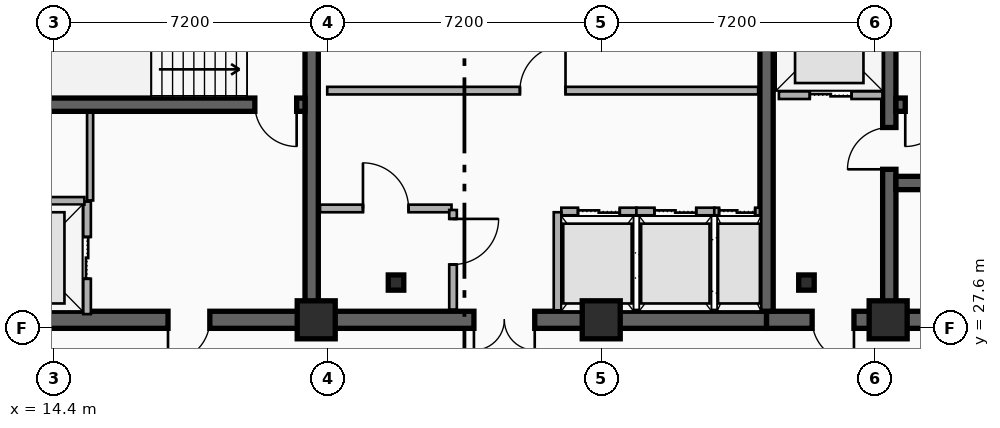
"""IFC4 building model, lengths in metres.
Left out: names, types, materials, properties, quantities, classifications, styles, units other than length and angle.
Written with IfcOpenShell. Run it as: python <this file> out.ifc"""

import sys

from ifc_helpers import new_model, si_unit, direction, frame, frame_2d, origin, origin_2d, place, context, subcontext, project, spatial, rectangle, i_section, extrude, element, fill, save


model = new_model("IFC4")
c1 = context("Model", 3, precision=1e-05, world=origin(), true_north=direction((0.0, 1.0)))
c2 = subcontext(c1, "Body", "Model", "MODEL_VIEW")
j1 = project(units=[si_unit("LENGTHUNIT", "METRE"), si_unit("PLANEANGLEUNIT", "RADIAN")], contexts=[c1])
p1 = place(None, origin())
s1 = spatial("IfcSite", under=j1, at=p1, CompositionType="ELEMENT")
p2 = place(p1, origin())
s2 = spatial("IfcBuilding", under=s1, at=p2, CompositionType="ELEMENT")
p3 = place(p2, frame((0.0, 0.0, 204.0)))
s3 = spatial("IfcBuildingStorey", under=s2, at=p3, CompositionType="ELEMENT", Elevation=204.0)
p4 = place(p3, frame((21.18, 27.82, 0.0), z_axis=(0.0, 0.0, 1.0), x_axis=(-1.0, 0.0, 0.0)))
e1 = element("IfcWall", 1, at=p4, inside=s3, PredefinedType="SHEAR", context=c2, shape_type="SweptSolid", body=[
    extrude(rectangle(XDim=9.03, YDim=0.45, at=frame_2d((4.515, 0.0))), origin(), (0.0, 0.0, 1.0), 3.6),
])
p5 = place(p4, frame((2.68, 0.0, 0.0)))
e2 = element("IfcOpeningElement", 2, at=p5, cuts=e1, PredefinedType="OPENING", context=c2, shape_type="SweptSolid", body=[
    extrude(rectangle(XDim=1.1, YDim=2.15, at=frame_2d((0.55, 1.075))), frame((0.0, 0.235, 0.0), z_axis=(0.0, -1.0, 0.0), x_axis=(1.0, 0.0, 0.0)), (0.0, 0.0, 1.0), 0.47),
])
p6 = place(p3, frame((33.15, 27.82, 0.0), z_axis=(0.0, 0.0, 1.0), x_axis=(-1.0, 0.0, 0.0)))
e3 = element("IfcWall", 3, at=p6, inside=s3, PredefinedType="SHEAR", context=c2, shape_type="SweptSolid", body=[
    extrude(rectangle(XDim=11.97, YDim=0.45, at=frame_2d((5.985, 0.0))), origin(), (0.0, 0.0, 1.0), 3.6),
])
p7 = place(p6, frame((6.1, 0.0, 0.0)))
e4 = element("IfcOpeningElement", 4, at=p7, cuts=e3, PredefinedType="OPENING", context=c2, shape_type="SweptSolid", body=[
    extrude(rectangle(XDim=1.6, YDim=2.2, at=frame_2d((0.8, 1.1))), frame((0.0, 0.235, 0.0), z_axis=(0.0, -1.0, 0.0), x_axis=(1.0, 0.0, 0.0)), (0.0, 0.0, 1.0), 0.47),
])
p8 = place(p3, frame((45.38, 27.82, 0.0), z_axis=(0.0, 0.0, 1.0), x_axis=(-1.0, 0.0, 0.0)))
e5 = element("IfcWall", 5, at=p8, inside=s3, PredefinedType="SHEAR", context=c2, shape_type="SweptSolid", body=[
    extrude(rectangle(XDim=12.23, YDim=0.45, at=frame_2d((6.115, 0.0))), origin(), (0.0, 0.0, 1.0), 3.6),
])
p9 = place(p8, frame((9.93, 0.0, 0.0)))
e6 = element("IfcOpeningElement", 6, at=p9, cuts=e5, PredefinedType="OPENING", context=c2, shape_type="SweptSolid", body=[
    extrude(rectangle(XDim=1.1, YDim=2.15, at=frame_2d((0.55, 1.075))), frame((0.0, 0.235, 0.0), z_axis=(0.0, -1.0, 0.0), x_axis=(1.0, 0.0, 0.0)), (0.0, 0.0, 1.0), 0.47),
])
p10 = place(p8, frame((6.23, 0.0, 0.0)))
e7 = element("IfcOpeningElement", 7, at=p10, cuts=e5, PredefinedType="OPENING", context=c2, shape_type="SweptSolid", body=[
    extrude(rectangle(XDim=1.1, YDim=2.15, at=frame_2d((0.55, 1.075))), frame((0.0, 0.235, 0.0), z_axis=(0.0, -1.0, 0.0), x_axis=(1.0, 0.0, 0.0)), (0.0, 0.0, 1.0), 0.47),
])
for number, where, z_axis, x_axis in (
    (8, (21.18, 28.045, 0.0), (0.0, 0.0, 1.0), (0.0, 1.0, 0.0)),
    (9, (33.15, 28.045, 0.0), (0.0, 0.0, 1.0), (0.0, 1.0, 0.0)),
):
    element("IfcWall", number, at=place(p3, frame(where, z_axis=z_axis, x_axis=x_axis)), inside=s3, PredefinedType="SHEAR", context=c2, shape_type="SweptSolid", body=[
        extrude(rectangle(XDim=8.78, YDim=0.35, at=frame_2d((4.39, 0.0))), origin(), (0.0, 0.0, 1.0), 3.6),
    ])
p11 = place(p3, frame((36.38, 28.045, 0.0), z_axis=(0.0, 0.0, 1.0), x_axis=(0.0, 1.0, 0.0)))
e10 = element("IfcWall", 10, at=p11, inside=s3, PredefinedType="SHEAR", context=c2, shape_type="SweptSolid", body=[
    extrude(rectangle(XDim=8.78, YDim=0.35, at=frame_2d((4.39, 0.0))), origin(), (0.0, 0.0, 1.0), 3.6),
])
p12 = place(p11, frame((3.735, 0.0, 0.0)))
e11 = element("IfcOpeningElement", 11, at=p12, cuts=e10, PredefinedType="OPENING", context=c2, shape_type="SweptSolid", body=[
    extrude(rectangle(XDim=1.1, YDim=2.15, at=frame_2d((0.55, 1.075))), frame((0.0, 0.185, 0.0), z_axis=(0.0, -1.0, 0.0), x_axis=(1.0, 0.0, 0.0)), (0.0, 0.0, 1.0), 0.37),
])
p13 = place(p3, frame((21.005, 33.48, 0.0), z_axis=(0.0, 0.0, 1.0), x_axis=(-1.0, 0.0, 0.0)))
e12 = element("IfcWall", 12, at=p13, inside=s3, PredefinedType="SHEAR", context=c2, shape_type="SweptSolid", body=[
    extrude(rectangle(XDim=8.63, YDim=0.35, at=frame_2d((4.315, 0.0))), origin(), (0.0, 0.0, 1.0), 3.6),
])
p14 = place(p13, frame((0.22, 0.0, 0.0)))
e13 = element("IfcOpeningElement", 13, at=p14, cuts=e12, PredefinedType="OPENING", context=c2, shape_type="SweptSolid", body=[
    extrude(rectangle(XDim=1.1, YDim=2.15, at=frame_2d((0.55, 1.075))), frame((0.0, 0.185, 0.0), z_axis=(0.0, -1.0, 0.0), x_axis=(1.0, 0.0, 0.0)), (0.0, 0.0, 1.0), 0.37),
])
p15 = place(p3, frame((45.155, 33.48, 0.0), z_axis=(0.0, 0.0, 1.0), x_axis=(-1.0, 0.0, 0.0)))
e14 = element("IfcWall", 14, at=p15, inside=s3, PredefinedType="SHEAR", context=c2, shape_type="SweptSolid", body=[
    extrude(rectangle(XDim=8.6, YDim=0.35, at=frame_2d((4.3, 0.0))), origin(), (0.0, 0.0, 1.0), 3.6),
])
p16 = place(p15, frame((7.255, 0.0, 0.0)))
e15 = element("IfcOpeningElement", 15, at=p16, cuts=e14, PredefinedType="OPENING", context=c2, shape_type="SweptSolid", body=[
    extrude(rectangle(XDim=1.1, YDim=2.15, at=frame_2d((0.55, 1.075))), frame((0.0, 0.185, 0.0), z_axis=(0.0, -1.0, 0.0), x_axis=(1.0, 0.0, 0.0)), (0.0, 0.0, 1.0), 0.37),
])
p17 = place(p3, frame((36.555, 31.42, 0.0), z_axis=(0.0, 0.0, 1.0), x_axis=(1.0, 0.0, 0.0)))
e16 = element("IfcWall", 16, at=p17, inside=s3, PredefinedType="SHEAR", context=c2, shape_type="SweptSolid", body=[
    extrude(rectangle(XDim=8.6, YDim=0.35, at=frame_2d((4.3, 0.0))), origin(), (0.0, 0.0, 1.0), 3.6),
])
for number, where, z_axis, x_axis in (
    (17, (23.4, 28.8, 0.0), (0.0, 0.0, 1.0), (1.0, 0.0, 0.0)),
    (18, (34.2, 28.8, 0.0), (0.0, 0.0, 1.0), (1.0, 0.0, 0.0)),
):
    element("IfcColumn", number, at=place(p3, frame(where, z_axis=z_axis, x_axis=x_axis)), inside=s3, PredefinedType="COLUMN", context=c2, shape_type="SweptSolid", body=[
        extrude(i_section(OverallWidth=0.408, OverallDepth=0.4, WebThickness=0.025, FlangeThickness=0.039, FilletRadius=0.015, at=origin_2d()), origin(), (0.0, 0.0, 1.0), 3.6),
    ])
for number, where, z_axis, x_axis in (
    (19, (21.3, 27.82, 0.0), (0.0, 0.0, 1.0), (1.0, 0.0, 0.0)),
    (20, (28.8, 27.82, 0.0), (0.0, 0.0, 1.0), (1.0, 0.0, 0.0)),
    (21, (36.35, 27.82, 0.0), (0.0, 0.0, 1.0), (1.0, 0.0, 0.0)),
):
    element("IfcColumn", number, at=place(p3, frame(where, z_axis=z_axis, x_axis=x_axis)), inside=s3, PredefinedType="COLUMN", context=c2, shape_type="SweptSolid", body=[
        extrude(rectangle(XDim=1.0, YDim=1.0, at=origin_2d()), origin(), (0.0, 0.0, 1.0), 3.6),
    ])
p18 = place(p3, frame((15.27, 27.97, 0.0), z_axis=(0.0, 0.0, 1.0), x_axis=(0.0, 1.0, 0.0)))
e22 = element("IfcWall", 22, at=p18, inside=s3, PredefinedType="PARTITIONING", context=c2, shape_type="SweptSolid", body=[
    extrude(rectangle(XDim=2.96, YDim=0.2, at=frame_2d((1.48, 0.0))), origin(), (0.0, 0.0, 1.0), 2.41),
])
p19 = place(p18, frame((0.93, 0.0, 0.0)))
e23 = element("IfcOpeningElement", 23, at=p19, cuts=e22, PredefinedType="OPENING", context=c2, shape_type="SweptSolid", body=[
    extrude(rectangle(XDim=1.1, YDim=2.15, at=frame_2d((0.55, 1.075))), frame((0.0, 0.11, 0.0), z_axis=(0.0, -1.0, 0.0), x_axis=(1.0, 0.0, 0.0)), (0.0, 0.0, 1.0), 0.22),
])
p20 = place(p3, frame((12.45, 30.95, 0.0), z_axis=(0.0, 0.0, 1.0), x_axis=(1.0, 0.0, 0.0)))
e24 = element("IfcWall", 24, at=p20, inside=s3, PredefinedType="PARTITIONING", context=c2, shape_type="SweptSolid", body=[
    extrude(rectangle(XDim=2.75, YDim=0.2, at=frame_2d((1.375, 0.0))), origin(), (0.0, 0.0, 1.0), 2.41),
])
p21 = place(p3, frame((33.475, 33.73, 0.0), z_axis=(0.0, 0.0, 1.0), x_axis=(1.0, 0.0, 0.0)))
e25 = element("IfcWall", 25, at=p21, inside=s3, PredefinedType="PARTITIONING", context=c2, shape_type="SweptSolid", body=[
    extrude(rectangle(XDim=2.725, YDim=0.2, at=frame_2d((1.362, 0.0))), origin(), (0.0, 0.0, 1.0), 2.41),
])
p22 = place(p21, frame((0.812, 0.0, 0.0)))
e26 = element("IfcOpeningElement", 26, at=p22, cuts=e25, PredefinedType="OPENING", context=c2, shape_type="SweptSolid", body=[
    extrude(rectangle(XDim=1.1, YDim=2.15, at=frame_2d((0.55, 1.075))), frame((0.0, 0.11, 0.0), z_axis=(0.0, -1.0, 0.0), x_axis=(1.0, 0.0, 0.0)), (0.0, 0.0, 1.0), 0.22),
])
p23 = place(p3, frame((27.75, 30.67, 0.0), z_axis=(0.0, 0.0, 1.0), x_axis=(1.0, 0.0, 0.0)))
e27 = element("IfcWall", 27, at=p23, inside=s3, PredefinedType="PARTITIONING", context=c2, shape_type="SweptSolid", body=[
    extrude(rectangle(XDim=1.975, YDim=0.2, at=frame_2d((0.988, 0.0))), origin(), (0.0, 0.0, 1.0), 2.41),
])
p24 = place(p23, frame((0.438, 0.0, 0.0)))
e28 = element("IfcOpeningElement", 28, at=p24, cuts=e27, PredefinedType="OPENING", context=c2, shape_type="SweptSolid", body=[
    extrude(rectangle(XDim=1.1, YDim=2.15, at=frame_2d((0.55, 1.075))), frame((0.0, 0.11, 0.0), z_axis=(0.0, -1.0, 0.0), x_axis=(1.0, 0.0, 0.0)), (0.0, 0.0, 1.0), 0.22),
])
p25 = place(p3, frame((27.65, 28.07, 0.0), z_axis=(0.0, 0.0, 1.0), x_axis=(0.0, 1.0, 0.0)))
e29 = element("IfcWall", 29, at=p25, inside=s3, PredefinedType="PARTITIONING", context=c2, shape_type="SweptSolid", body=[
    extrude(rectangle(XDim=2.58, YDim=0.2, at=frame_2d((1.29, 0.0))), origin(), (0.0, 0.0, 1.0), 2.41),
])
p26 = place(p3, frame((29.725, 30.67, 0.0), z_axis=(0.0, 0.0, 1.0), x_axis=(1.0, 0.0, 0.0)))
e30 = element("IfcWall", 30, at=p26, inside=s3, PredefinedType="PARTITIONING", context=c2, shape_type="SweptSolid", body=[
    extrude(rectangle(XDim=2.05, YDim=0.2, at=frame_2d((1.025, 0.0))), origin(), (0.0, 0.0, 1.0), 2.72),
])
p27 = place(p26, frame((0.475, 0.0, 0.0)))
e31 = element("IfcOpeningElement", 31, at=p27, cuts=e30, PredefinedType="OPENING", context=c2, shape_type="SweptSolid", body=[
    extrude(rectangle(XDim=1.1, YDim=2.15, at=frame_2d((0.55, 1.075))), frame((0.0, 0.11, 0.0), z_axis=(0.0, -1.0, 0.0), x_axis=(1.0, 0.0, 0.0)), (0.0, 0.0, 1.0), 0.22),
])
p28 = place(p3, frame((31.775, 30.67, 0.0), z_axis=(0.0, 0.0, 1.0), x_axis=(1.0, 0.0, 0.0)))
e32 = element("IfcWall", 32, at=p28, inside=s3, PredefinedType="PARTITIONING", context=c2, shape_type="SweptSolid", body=[
    extrude(rectangle(XDim=1.2, YDim=0.2, at=frame_2d((0.6, 0.0))), origin(), (0.0, 0.0, 1.0), 2.72),
])
p29 = place(p28, frame((0.125, 0.0, 0.0)))
e33 = element("IfcOpeningElement", 33, at=p29, cuts=e32, PredefinedType="OPENING", context=c2, shape_type="SweptSolid", body=[
    extrude(rectangle(XDim=0.95, YDim=2.15, at=frame_2d((0.475, 1.075))), frame((0.0, 0.11, 0.0), z_axis=(0.0, -1.0, 0.0), x_axis=(1.0, 0.0, 0.0)), (0.0, 0.0, 1.0), 0.22),
])
p30 = place(p3, frame((21.4, 30.75, 0.0), z_axis=(0.0, 0.0, 1.0), x_axis=(1.0, 0.0, 0.0)))
e34 = element("IfcWall", 34, at=p30, inside=s3, PredefinedType="PARTITIONING", context=c2, shape_type="SweptSolid", body=[
    extrude(rectangle(XDim=3.46, YDim=0.2, at=frame_2d((1.73, 0.0))), origin(), (0.0, 0.0, 1.0), 2.41),
])
p31 = place(p30, frame((1.13, 0.0, 0.0)))
e35 = element("IfcOpeningElement", 35, at=p31, cuts=e34, PredefinedType="OPENING", context=c2, shape_type="SweptSolid", body=[
    extrude(rectangle(XDim=1.2, YDim=2.15, at=frame_2d((0.6, 1.075))), frame((0.0, 0.11, 0.0), z_axis=(0.0, -1.0, 0.0), x_axis=(1.0, 0.0, 0.0)), (0.0, 0.0, 1.0), 0.22),
])
p32 = place(p3, frame((21.59, 33.85, 0.0), z_axis=(0.0, 0.0, 1.0), x_axis=(1.0, 0.0, 0.0)))
e36 = element("IfcWall", 36, at=p32, inside=s3, PredefinedType="PARTITIONING", context=c2, shape_type="SweptSolid", body=[
    extrude(rectangle(XDim=11.34, YDim=0.2, at=frame_2d((5.67, 0.0))), origin(), (0.0, 0.0, 1.0), 2.41),
])
p33 = place(p32, frame((5.07, 0.0, 0.0)))
e37 = element("IfcOpeningElement", 37, at=p33, cuts=e36, PredefinedType="OPENING", context=c2, shape_type="SweptSolid", body=[
    extrude(rectangle(XDim=1.2, YDim=2.15, at=frame_2d((0.6, 1.075))), frame((0.0, 0.11, 0.0), z_axis=(0.0, -1.0, 0.0), x_axis=(1.0, 0.0, 0.0)), (0.0, 0.0, 1.0), 0.22),
])
p34 = place(p3, frame((24.9, 30.71, 0.0), z_axis=(0.0, 0.0, 1.0), x_axis=(0.0, -1.0, 0.0)))
e38 = element("IfcWall", 38, at=p34, inside=s3, PredefinedType="PARTITIONING", context=c2, shape_type="SweptSolid", body=[
    extrude(rectangle(XDim=2.62, YDim=0.2, at=frame_2d((1.31, 0.0))), origin(), (0.0, 0.0, 1.0), 2.72),
])
p35 = place(p34, frame((0.235, 0.0, 0.0)))
e39 = element("IfcOpeningElement", 39, at=p35, cuts=e38, PredefinedType="OPENING", context=c2, shape_type="SweptSolid", body=[
    extrude(rectangle(XDim=1.2, YDim=2.15, at=frame_2d((0.6, 1.075))), frame((0.0, 0.11, 0.0), z_axis=(0.0, -1.0, 0.0), x_axis=(1.0, 0.0, 0.0)), (0.0, 0.0, 1.0), 0.22),
])
p36 = place(p3, frame((15.35, 30.96, 0.0), z_axis=(0.0, 0.0, 1.0), x_axis=(0.0, 1.0, 0.0)))
e40 = element("IfcWall", 40, at=p36, inside=s3, PredefinedType="PARTITIONING", context=c2, shape_type="SweptSolid", body=[
    extrude(rectangle(XDim=2.31, YDim=0.16, at=frame_2d((1.155, 0.0))), origin(), (0.0, 0.0, 1.0), 3.34),
])
p37 = place(p19, origin())
e41 = element("IfcDoor", 41, at=p37, inside=s3, OperationType="DOUBLE_DOOR_SLIDING", PredefinedType="DOOR", context=c2, shape_type="SweptSolid", body=[
    extrude(rectangle(XDim=1.1, YDim=2.15, at=frame_2d((0.55, 1.075))), frame((0.0, 0.025, 0.0), z_axis=(0.0, -1.0, 0.0), x_axis=(1.0, 0.0, 0.0)), (0.0, 0.0, 1.0), 0.05),
])
fill(e23, e41)
p38 = place(p22, origin())
e42 = element("IfcDoor", 42, at=p38, inside=s3, OperationType="DOUBLE_DOOR_SLIDING", PredefinedType="DOOR", context=c2, shape_type="SweptSolid", body=[
    extrude(rectangle(XDim=1.1, YDim=2.15, at=frame_2d((0.55, 1.075))), frame((0.0, 0.025, 0.0), z_axis=(0.0, -1.0, 0.0), x_axis=(1.0, 0.0, 0.0)), (0.0, 0.0, 1.0), 0.05),
])
fill(e26, e42)
p39 = place(p24, origin())
e43 = element("IfcDoor", 43, at=p39, inside=s3, OperationType="DOUBLE_DOOR_SLIDING", PredefinedType="DOOR", context=c2, shape_type="SweptSolid", body=[
    extrude(rectangle(XDim=1.1, YDim=2.15, at=frame_2d((0.55, 1.075))), frame((0.0, 0.025, 0.0), z_axis=(0.0, -1.0, 0.0), x_axis=(1.0, 0.0, 0.0)), (0.0, 0.0, 1.0), 0.05),
])
fill(e28, e43)
p40 = place(p27, origin())
e44 = element("IfcDoor", 44, at=p40, inside=s3, OperationType="DOUBLE_DOOR_SLIDING", PredefinedType="DOOR", context=c2, shape_type="SweptSolid", body=[
    extrude(rectangle(XDim=1.1, YDim=2.15, at=frame_2d((0.55, 1.075))), frame((0.0, 0.025, 0.0), z_axis=(0.0, -1.0, 0.0), x_axis=(1.0, 0.0, 0.0)), (0.0, 0.0, 1.0), 0.05),
])
fill(e31, e44)
p41 = place(p29, origin())
e45 = element("IfcDoor", 45, at=p41, inside=s3, OperationType="DOUBLE_DOOR_SLIDING", PredefinedType="DOOR", context=c2, shape_type="SweptSolid", body=[
    extrude(rectangle(XDim=0.95, YDim=2.15, at=frame_2d((0.475, 1.075))), frame((0.0, 0.025, 0.0), z_axis=(0.0, -1.0, 0.0), x_axis=(1.0, 0.0, 0.0)), (0.0, 0.0, 1.0), 0.05),
])
fill(e33, e45)
p42 = place(p14, origin())
e46 = element("IfcDoor", 46, at=p42, inside=s3, OperationType="SINGLE_SWING_LEFT", PredefinedType="DOOR", context=c2, shape_type="SweptSolid", body=[
    extrude(rectangle(XDim=1.1, YDim=2.15, at=frame_2d((0.55, 1.075))), frame((0.0, 0.025, 0.0), z_axis=(0.0, -1.0, 0.0), x_axis=(1.0, 0.0, 0.0)), (0.0, 0.0, 1.0), 0.05),
])
fill(e13, e46)
p43 = place(p5, origin())
e47 = element("IfcDoor", 47, at=p43, inside=s3, OperationType="SINGLE_SWING_RIGHT", PredefinedType="DOOR", context=c2, shape_type="SweptSolid", body=[
    extrude(rectangle(XDim=1.1, YDim=2.15, at=frame_2d((0.55, 1.075))), frame((0.0, 0.025, 0.0), z_axis=(0.0, -1.0, 0.0), x_axis=(1.0, 0.0, 0.0)), (0.0, 0.0, 1.0), 0.05),
])
fill(e2, e47)
p44 = place(p16, origin())
e48 = element("IfcDoor", 48, at=p44, inside=s3, OperationType="SINGLE_SWING_RIGHT", PredefinedType="DOOR", context=c2, shape_type="SweptSolid", body=[
    extrude(rectangle(XDim=1.1, YDim=2.15, at=frame_2d((0.55, 1.075))), frame((0.0, 0.025, 0.0), z_axis=(0.0, -1.0, 0.0), x_axis=(1.0, 0.0, 0.0)), (0.0, 0.0, 1.0), 0.05),
])
fill(e15, e48)
p45 = place(p12, origin())
e49 = element("IfcDoor", 49, at=p45, inside=s3, OperationType="SINGLE_SWING_LEFT", PredefinedType="DOOR", context=c2, shape_type="SweptSolid", body=[
    extrude(rectangle(XDim=1.1, YDim=2.15, at=frame_2d((0.55, 1.075))), frame((0.0, 0.025, 0.0), z_axis=(0.0, -1.0, 0.0), x_axis=(1.0, 0.0, 0.0)), (0.0, 0.0, 1.0), 0.05),
])
fill(e11, e49)
p46 = place(p9, origin())
e50 = element("IfcDoor", 50, at=p46, inside=s3, OperationType="SINGLE_SWING_LEFT", PredefinedType="DOOR", context=c2, shape_type="SweptSolid", body=[
    extrude(rectangle(XDim=1.1, YDim=2.15, at=frame_2d((0.55, 1.075))), frame((0.0, 0.025, 0.0), z_axis=(0.0, -1.0, 0.0), x_axis=(1.0, 0.0, 0.0)), (0.0, 0.0, 1.0), 0.05),
])
fill(e6, e50)
p47 = place(p7, origin())
e51 = element("IfcDoor", 51, at=p47, inside=s3, OperationType="SINGLE_SWING_LEFT", PredefinedType="DOOR", context=c2, shape_type="SweptSolid", body=[
    extrude(rectangle(XDim=1.6, YDim=2.2, at=frame_2d((0.8, 1.1))), frame((0.0, 0.025, 0.0), z_axis=(0.0, -1.0, 0.0), x_axis=(1.0, 0.0, 0.0)), (0.0, 0.0, 1.0), 0.05),
])
fill(e4, e51)
p48 = place(p31, origin())
e52 = element("IfcDoor", 52, at=p48, inside=s3, OperationType="SINGLE_SWING_LEFT", PredefinedType="DOOR", context=c2, shape_type="SweptSolid", body=[
    extrude(rectangle(XDim=1.2, YDim=2.15, at=frame_2d((0.6, 1.075))), frame((0.0, 0.025, 0.0), z_axis=(0.0, -1.0, 0.0), x_axis=(1.0, 0.0, 0.0)), (0.0, 0.0, 1.0), 0.05),
])
fill(e35, e52)
p49 = place(p33, origin())
e53 = element("IfcDoor", 53, at=p49, inside=s3, OperationType="SINGLE_SWING_RIGHT", PredefinedType="DOOR", context=c2, shape_type="SweptSolid", body=[
    extrude(rectangle(XDim=1.2, YDim=2.15, at=frame_2d((0.6, 1.075))), frame((0.0, 0.025, 0.0), z_axis=(0.0, -1.0, 0.0), x_axis=(1.0, 0.0, 0.0)), (0.0, 0.0, 1.0), 0.05),
])
fill(e37, e53)
p50 = place(p35, origin())
e54 = element("IfcDoor", 54, at=p50, inside=s3, OperationType="SINGLE_SWING_LEFT", PredefinedType="DOOR", context=c2, shape_type="SweptSolid", body=[
    extrude(rectangle(XDim=1.2, YDim=2.15, at=frame_2d((0.6, 1.075))), frame((0.0, 0.025, 0.0), z_axis=(0.0, -1.0, 0.0), x_axis=(1.0, 0.0, 0.0)), (0.0, 0.0, 1.0), 0.05),
])
fill(e39, e54)
save(model, sys.argv[1])
